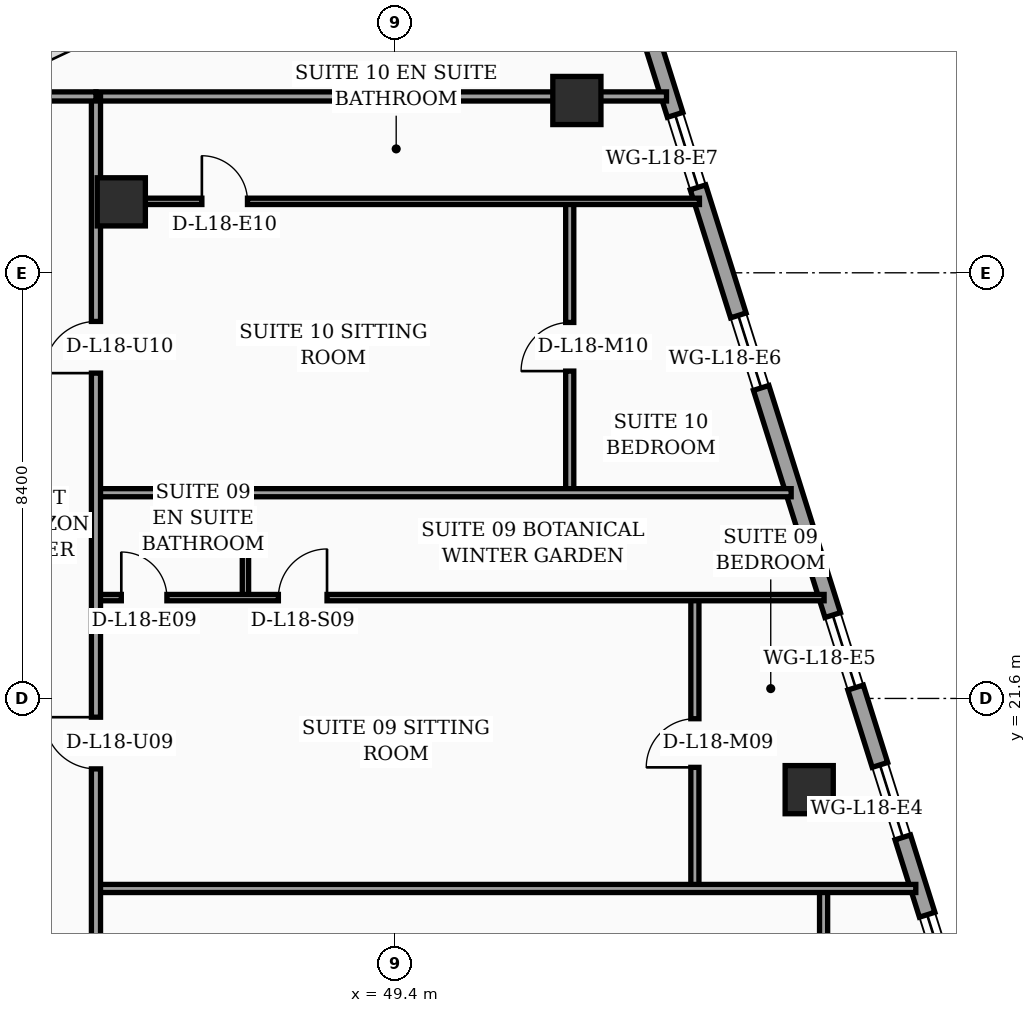
"""IFC4 building model, lengths in metres.
Left out: names, types, materials, properties, quantities, classifications, styles, units other than length and angle.
Written with IfcOpenShell. Run it as: python <this file> out.ifc"""

import sys

from ifc_helpers import new_model, si_unit, direction, frame, frame_2d, origin, origin_2d, place, context, subcontext, project, spatial, rectangle, hollow_rectangle, extrude, element, fill, save


model = new_model("IFC4")
c1 = context("Model", 3, precision=1e-05, world=origin(), true_north=direction((0.0, 1.0)))
c2 = subcontext(c1, "Body", "Model", "MODEL_VIEW")
j1 = project(units=[si_unit("LENGTHUNIT", "METRE"), si_unit("PLANEANGLEUNIT", "RADIAN")], contexts=[c1])
p1 = place(None, origin())
s1 = spatial("IfcSite", under=j1, at=p1, CompositionType="ELEMENT")
p2 = place(p1, origin())
s2 = spatial("IfcBuilding", under=s1, at=p2, CompositionType="ELEMENT")
p3 = place(p2, frame((0.0, 0.0, 77.4)))
s3 = spatial("IfcBuildingStorey", under=s2, at=p3, CompositionType="ELEMENT", Elevation=77.4)
for number, where, z_axis, x_axis in (
    (1, (44.0, 31.4, 0.0), (0.0, 0.0, 1.0), (1.0, 0.0, 0.0)),
    (2, (57.576, 19.8, 0.0), (0.0, 0.0, 1.0), (1.0, 0.0, 0.0)),
    (3, (52.991, 33.4, 0.0), (0.0, 0.0, 1.0), (1.0, 0.0, 0.0)),
):
    element("IfcColumn", number, at=place(p3, frame(where, z_axis=z_axis, x_axis=x_axis)), inside=s3, PredefinedType="COLUMN", context=c2, shape_type="SweptSolid", body=[
        extrude(hollow_rectangle(XDim=0.95, YDim=0.95, WallThickness=0.04, at=origin_2d()), origin(), (0.0, 0.0, 1.0), 3.56),
    ])
p4 = place(p3, frame((63.63, 5.505, 0.0), z_axis=(0.0, 0.0, 1.0), x_axis=(-0.300501856448, 0.953781229775, 0.0)))
e4 = element("IfcWall", 4, at=p4, inside=s3, PredefinedType="SOLIDWALL", context=c2, shape_type="SweptSolid", body=[
    extrude(rectangle(XDim=30.814, YDim=0.32, at=frame_2d((15.407, 0.0))), origin(), (0.0, 0.0, 1.0), 3.56),
])
p5 = place(p4, frame((4.747, 0.0, 0.0)))
e5 = element("IfcOpeningElement", 5, at=p5, cuts=e4, PredefinedType="OPENING", context=c2, shape_type="SweptSolid", body=[
    extrude(rectangle(XDim=1.4, YDim=2.25, at=frame_2d((0.7, 1.125))), frame((0.0, 0.17, 0.0), z_axis=(0.0, -1.0, 0.0), x_axis=(1.0, 0.0, 0.0)), (0.0, 0.0, 1.0), 0.34),
])
p6 = place(p4, frame((2.65, 0.0, 0.75)))
e6 = element("IfcOpeningElement", 6, at=p6, cuts=e4, PredefinedType="OPENING", context=c2, shape_type="SweptSolid", body=[
    extrude(rectangle(XDim=1.5, YDim=1.6, at=frame_2d((0.75, 0.8))), frame((0.0, 0.17, 0.0), z_axis=(0.0, -1.0, 0.0), x_axis=(1.0, 0.0, 0.0)), (0.0, 0.0, 1.0), 0.34),
])
p7 = place(p4, frame((7.8, 0.0, 0.75)))
e7 = element("IfcOpeningElement", 7, at=p7, cuts=e4, PredefinedType="OPENING", context=c2, shape_type="SweptSolid", body=[
    extrude(rectangle(XDim=1.5, YDim=1.6, at=frame_2d((0.75, 0.8))), frame((0.0, 0.17, 0.0), z_axis=(0.0, -1.0, 0.0), x_axis=(1.0, 0.0, 0.0)), (0.0, 0.0, 1.0), 0.34),
])
p8 = place(p4, frame((10.9, 0.0, 0.75)))
e8 = element("IfcOpeningElement", 8, at=p8, cuts=e4, PredefinedType="OPENING", context=c2, shape_type="SweptSolid", body=[
    extrude(rectangle(XDim=1.5, YDim=1.6, at=frame_2d((0.75, 0.8))), frame((0.0, 0.17, 0.0), z_axis=(0.0, -1.0, 0.0), x_axis=(1.0, 0.0, 0.0)), (0.0, 0.0, 1.0), 0.34),
])
p9 = place(p4, frame((14.0, 0.0, 0.75)))
e9 = element("IfcOpeningElement", 9, at=p9, cuts=e4, PredefinedType="OPENING", context=c2, shape_type="SweptSolid", body=[
    extrude(rectangle(XDim=1.5, YDim=1.6, at=frame_2d((0.75, 0.8))), frame((0.0, 0.17, 0.0), z_axis=(0.0, -1.0, 0.0), x_axis=(1.0, 0.0, 0.0)), (0.0, 0.0, 1.0), 0.34),
])
p10 = place(p4, frame((17.1, 0.0, 0.75)))
e10 = element("IfcOpeningElement", 10, at=p10, cuts=e4, PredefinedType="OPENING", context=c2, shape_type="SweptSolid", body=[
    extrude(rectangle(XDim=1.5, YDim=1.6, at=frame_2d((0.75, 0.8))), frame((0.0, 0.17, 0.0), z_axis=(0.0, -1.0, 0.0), x_axis=(1.0, 0.0, 0.0)), (0.0, 0.0, 1.0), 0.34),
])
p11 = place(p4, frame((23.3, 0.0, 0.75)))
e11 = element("IfcOpeningElement", 11, at=p11, cuts=e4, PredefinedType="OPENING", context=c2, shape_type="SweptSolid", body=[
    extrude(rectangle(XDim=1.5, YDim=1.6, at=frame_2d((0.75, 0.8))), frame((0.0, 0.17, 0.0), z_axis=(0.0, -1.0, 0.0), x_axis=(1.0, 0.0, 0.0)), (0.0, 0.0, 1.0), 0.34),
])
p12 = place(p4, frame((27.45, 0.0, 0.75)))
e12 = element("IfcOpeningElement", 12, at=p12, cuts=e4, PredefinedType="OPENING", context=c2, shape_type="SweptSolid", body=[
    extrude(rectangle(XDim=1.5, YDim=1.6, at=frame_2d((0.75, 0.8))), frame((0.0, 0.17, 0.0), z_axis=(0.0, -1.0, 0.0), x_axis=(1.0, 0.0, 0.0)), (0.0, 0.0, 1.0), 0.34),
])
p13 = place(p3, frame((57.86, 7.45, 0.0), z_axis=(0.0, 0.0, 1.0), x_axis=(0.0, 1.0, 0.0)))
e13 = element("IfcWall", 13, at=p13, inside=s3, PredefinedType="PARTITIONING", context=c2, shape_type="SweptSolid", body=[
    extrude(rectangle(XDim=10.4, YDim=0.16, at=frame_2d((5.2, 0.0))), origin(), (0.0, 0.0, 1.0), 3.04),
])
p14 = place(p13, frame((4.72, 0.0, 0.0)))
e14 = element("IfcOpeningElement", 14, at=p14, cuts=e13, PredefinedType="OPENING", context=c2, shape_type="SweptSolid", body=[
    extrude(rectangle(XDim=0.96, YDim=2.2, at=frame_2d((0.48, 1.1))), frame((0.0, 0.09, 0.0), z_axis=(0.0, -1.0, 0.0), x_axis=(1.0, 0.0, 0.0)), (0.0, 0.0, 1.0), 0.18),
])
p15 = place(p3, frame((46.45, 23.59, 0.0), z_axis=(0.0, 0.0, 1.0), x_axis=(0.0, 1.0, 0.0)))
e15 = element("IfcWall", 15, at=p15, inside=s3, PredefinedType="PARTITIONING", context=c2, shape_type="SweptSolid", body=[
    extrude(rectangle(XDim=2.07, YDim=0.125, at=frame_2d((1.035, 0.0))), origin(), (0.0, 0.0, 1.0), 3.19),
])
p16 = place(p3, frame((55.32, 17.85, 0.0), z_axis=(0.0, 0.0, 1.0), x_axis=(0.0, 1.0, 0.0)))
e16 = element("IfcWall", 16, at=p16, inside=s3, PredefinedType="PARTITIONING", context=c2, shape_type="SweptSolid", body=[
    extrude(rectangle(XDim=5.74, YDim=0.16, at=frame_2d((2.87, 0.0))), origin(), (0.0, 0.0, 1.0), 2.84),
])
p17 = place(p16, frame((2.39, 0.0, 0.0)))
e17 = element("IfcOpeningElement", 17, at=p17, cuts=e16, PredefinedType="OPENING", context=c2, shape_type="SweptSolid", body=[
    extrude(rectangle(XDim=0.96, YDim=2.2, at=frame_2d((0.48, 1.1))), frame((0.0, 0.09, 0.0), z_axis=(0.0, -1.0, 0.0), x_axis=(1.0, 0.0, 0.0)), (0.0, 0.0, 1.0), 0.18),
])
p18 = place(p3, frame((43.5, 23.59, 0.0), z_axis=(0.0, 0.0, 1.0), x_axis=(1.0, 0.0, 0.0)))
e18 = element("IfcWall", 18, at=p18, inside=s3, PredefinedType="PARTITIONING", context=c2, shape_type="SweptSolid", body=[
    extrude(rectangle(XDim=14.37, YDim=0.125, at=frame_2d((7.185, 0.0))), origin(), (0.0, 0.0, 1.0), 2.84),
])
p19 = place(p18, frame((0.5, 0.0, 0.0)))
e19 = element("IfcOpeningElement", 19, at=p19, cuts=e18, PredefinedType="OPENING", context=c2, shape_type="SweptSolid", body=[
    extrude(rectangle(XDim=0.9, YDim=2.15, at=frame_2d((0.45, 1.075))), frame((0.0, 0.073, 0.0), z_axis=(0.0, -1.0, 0.0), x_axis=(1.0, 0.0, 0.0)), (0.0, 0.0, 1.0), 0.145),
])
p20 = place(p18, frame((3.6, 0.0, 0.0)))
e20 = element("IfcOpeningElement", 20, at=p20, cuts=e18, PredefinedType="OPENING", context=c2, shape_type="SweptSolid", body=[
    extrude(rectangle(XDim=0.96, YDim=2.2, at=frame_2d((0.48, 1.1))), frame((0.0, 0.073, 0.0), z_axis=(0.0, -1.0, 0.0), x_axis=(1.0, 0.0, 0.0)), (0.0, 0.0, 1.0), 0.145),
])
p21 = place(p3, frame((52.85, 25.66, 0.0), z_axis=(0.0, 0.0, 1.0), x_axis=(0.0, 1.0, 0.0)))
e21 = element("IfcWall", 21, at=p21, inside=s3, PredefinedType="PARTITIONING", context=c2, shape_type="SweptSolid", body=[
    extrude(rectangle(XDim=5.75, YDim=0.16, at=frame_2d((2.875, 0.0))), origin(), (0.0, 0.0, 1.0), 3.56),
])
p22 = place(p21, frame((2.4, 0.0, 0.0)))
e22 = element("IfcOpeningElement", 22, at=p22, cuts=e21, PredefinedType="OPENING", context=c2, shape_type="SweptSolid", body=[
    extrude(rectangle(XDim=0.96, YDim=2.2, at=frame_2d((0.48, 1.1))), frame((0.0, 0.09, 0.0), z_axis=(0.0, -1.0, 0.0), x_axis=(1.0, 0.0, 0.0)), (0.0, 0.0, 1.0), 0.18),
])
p23 = place(p3, frame((43.5, 31.41, 0.0), z_axis=(0.0, 0.0, 1.0), x_axis=(1.0, 0.0, 0.0)))
e23 = element("IfcWall", 23, at=p23, inside=s3, PredefinedType="PARTITIONING", context=c2, shape_type="SweptSolid", body=[
    extrude(rectangle(XDim=11.91, YDim=0.125, at=frame_2d((5.955, 0.0))), origin(), (0.0, 0.0, 1.0), 2.84),
])
p24 = place(p23, frame((2.09, 0.0, 0.0)))
e24 = element("IfcOpeningElement", 24, at=p24, cuts=e23, PredefinedType="OPENING", context=c2, shape_type="SweptSolid", body=[
    extrude(rectangle(XDim=0.9, YDim=2.15, at=frame_2d((0.45, 1.075))), frame((0.0, 0.073, 0.0), z_axis=(0.0, -1.0, 0.0), x_axis=(1.0, 0.0, 0.0)), (0.0, 0.0, 1.0), 0.145),
])
p25 = place(p3, frame((43.5, 25.66, 0.0), z_axis=(0.0, 0.0, 1.0), x_axis=(1.0, 0.0, 0.0)))
e25 = element("IfcWall", 25, at=p25, inside=s3, PredefinedType="PARTITIONING", context=c2, shape_type="SweptSolid", body=[
    extrude(rectangle(XDim=13.72, YDim=0.16, at=frame_2d((6.86, 0.0))), origin(), (0.0, 0.0, 1.0), 2.84),
])
p26 = place(p3, frame((43.5, 17.85, 0.0), z_axis=(0.0, 0.0, 1.0), x_axis=(1.0, 0.0, 0.0)))
e26 = element("IfcWall", 26, at=p26, inside=s3, PredefinedType="PARTITIONING", context=c2, shape_type="SweptSolid", body=[
    extrude(rectangle(XDim=16.18, YDim=0.16, at=frame_2d((8.09, 0.0))), origin(), (0.0, 0.0, 1.0), 2.84),
])
p27 = place(p3, frame((43.5, 33.48, 0.0), z_axis=(0.0, 0.0, 1.0), x_axis=(1.0, 0.0, 0.0)))
e27 = element("IfcWall", 27, at=p27, inside=s3, PredefinedType="PARTITIONING", context=c2, shape_type="SweptSolid", body=[
    extrude(rectangle(XDim=11.26, YDim=0.18, at=frame_2d((5.63, 0.0))), origin(), (0.0, 0.0, 1.0), 2.84),
])
p28 = place(p3, frame((43.5, 2.44, 0.0), z_axis=(0.0, 0.0, 1.0), x_axis=(0.0, 1.0, 0.0)))
e28 = element("IfcWall", 28, at=p28, inside=s3, PredefinedType="PARTITIONING", context=c2, shape_type="SweptSolid", body=[
    extrude(rectangle(XDim=31.04, YDim=0.18, at=frame_2d((15.52, 0.0))), origin(), (0.0, 0.0, 1.0), 2.84),
])
p29 = place(p28, frame((13.26, 0.0, 0.0)))
e29 = element("IfcOpeningElement", 29, at=p29, cuts=e28, PredefinedType="OPENING", context=c2, shape_type="SweptSolid", body=[
    extrude(rectangle(XDim=1.02, YDim=2.2, at=frame_2d((0.51, 1.1))), frame((0.0, 0.1, 0.0), z_axis=(0.0, -1.0, 0.0), x_axis=(1.0, 0.0, 0.0)), (0.0, 0.0, 1.0), 0.2),
])
p30 = place(p28, frame((17.77, 0.0, 0.0)))
e30 = element("IfcOpeningElement", 30, at=p30, cuts=e28, PredefinedType="OPENING", context=c2, shape_type="SweptSolid", body=[
    extrude(rectangle(XDim=1.02, YDim=2.2, at=frame_2d((0.51, 1.1))), frame((0.0, 0.1, 0.0), z_axis=(0.0, -1.0, 0.0), x_axis=(1.0, 0.0, 0.0)), (0.0, 0.0, 1.0), 0.2),
])
p31 = place(p28, frame((25.58, 0.0, 0.0)))
e31 = element("IfcOpeningElement", 31, at=p31, cuts=e28, PredefinedType="OPENING", context=c2, shape_type="SweptSolid", body=[
    extrude(rectangle(XDim=1.02, YDim=2.2, at=frame_2d((0.51, 1.1))), frame((0.0, 0.1, 0.0), z_axis=(0.0, -1.0, 0.0), x_axis=(1.0, 0.0, 0.0)), (0.0, 0.0, 1.0), 0.2),
])
p32 = place(p3, frame((41.15, 33.48, 0.0), z_axis=(0.0, 0.0, 1.0), x_axis=(1.0, 0.0, 0.0)))
e32 = element("IfcWall", 32, at=p32, inside=s3, PredefinedType="PARTITIONING", context=c2, shape_type="SweptSolid", body=[
    extrude(rectangle(XDim=2.35, YDim=0.18, at=frame_2d((1.175, 0.0))), origin(), (0.0, 0.0, 1.0), 3.56),
])
p33 = place(p8, origin())
e33 = element("IfcWindow", 33, at=p33, inside=s3, PartitioningType="SINGLE_PANEL", PredefinedType="WINDOW", context=c2, shape_type="SweptSolid", body=[
    extrude(rectangle(XDim=1.5, YDim=1.6, at=frame_2d((0.75, 0.8))), frame((0.0, 0.03, 0.0), z_axis=(0.0, -1.0, 0.0), x_axis=(1.0, 0.0, 0.0)), (0.0, 0.0, 1.0), 0.06),
])
fill(e8, e33)
p34 = place(p9, origin())
e34 = element("IfcWindow", 34, at=p34, inside=s3, PartitioningType="SINGLE_PANEL", PredefinedType="WINDOW", context=c2, shape_type="SweptSolid", body=[
    extrude(rectangle(XDim=1.5, YDim=1.6, at=frame_2d((0.75, 0.8))), frame((0.0, 0.03, 0.0), z_axis=(0.0, -1.0, 0.0), x_axis=(1.0, 0.0, 0.0)), (0.0, 0.0, 1.0), 0.06),
])
fill(e9, e34)
p35 = place(p10, origin())
e35 = element("IfcWindow", 35, at=p35, inside=s3, PartitioningType="SINGLE_PANEL", PredefinedType="WINDOW", context=c2, shape_type="SweptSolid", body=[
    extrude(rectangle(XDim=1.5, YDim=1.6, at=frame_2d((0.75, 0.8))), frame((0.0, 0.03, 0.0), z_axis=(0.0, -1.0, 0.0), x_axis=(1.0, 0.0, 0.0)), (0.0, 0.0, 1.0), 0.06),
])
fill(e10, e35)
p36 = place(p11, origin())
e36 = element("IfcWindow", 36, at=p36, inside=s3, PartitioningType="SINGLE_PANEL", PredefinedType="WINDOW", context=c2, shape_type="SweptSolid", body=[
    extrude(rectangle(XDim=1.5, YDim=1.6, at=frame_2d((0.75, 0.8))), frame((0.0, 0.03, 0.0), z_axis=(0.0, -1.0, 0.0), x_axis=(1.0, 0.0, 0.0)), (0.0, 0.0, 1.0), 0.06),
])
fill(e11, e36)
p37 = place(p12, origin())
e37 = element("IfcWindow", 37, at=p37, inside=s3, PartitioningType="SINGLE_PANEL", PredefinedType="WINDOW", context=c2, shape_type="SweptSolid", body=[
    extrude(rectangle(XDim=1.5, YDim=1.6, at=frame_2d((0.75, 0.8))), frame((0.0, 0.03, 0.0), z_axis=(0.0, -1.0, 0.0), x_axis=(1.0, 0.0, 0.0)), (0.0, 0.0, 1.0), 0.06),
])
fill(e12, e37)
p38 = place(p17, origin())
e38 = element("IfcDoor", 38, at=p38, inside=s3, OperationType="SINGLE_SWING_LEFT", PredefinedType="DOOR", context=c2, shape_type="SweptSolid", body=[
    extrude(rectangle(XDim=0.96, YDim=2.2, at=frame_2d((0.48, 1.1))), frame((0.0, 0.025, 0.0), z_axis=(0.0, -1.0, 0.0), x_axis=(1.0, 0.0, 0.0)), (0.0, 0.0, 1.0), 0.05),
])
fill(e17, e38)
p39 = place(p19, origin())
e39 = element("IfcDoor", 39, at=p39, inside=s3, OperationType="SINGLE_SWING_LEFT", PredefinedType="DOOR", context=c2, shape_type="SweptSolid", body=[
    extrude(rectangle(XDim=0.9, YDim=2.15, at=frame_2d((0.45, 1.075))), frame((0.0, 0.025, 0.0), z_axis=(0.0, -1.0, 0.0), x_axis=(1.0, 0.0, 0.0)), (0.0, 0.0, 1.0), 0.05),
])
fill(e19, e39)
p40 = place(p20, origin())
e40 = element("IfcDoor", 40, at=p40, inside=s3, OperationType="SINGLE_SWING_RIGHT", PredefinedType="DOOR", context=c2, shape_type="SweptSolid", body=[
    extrude(rectangle(XDim=0.96, YDim=2.2, at=frame_2d((0.48, 1.1))), frame((0.0, 0.025, 0.0), z_axis=(0.0, -1.0, 0.0), x_axis=(1.0, 0.0, 0.0)), (0.0, 0.0, 1.0), 0.05),
])
fill(e20, e40)
p41 = place(p22, origin())
e41 = element("IfcDoor", 41, at=p41, inside=s3, OperationType="SINGLE_SWING_LEFT", PredefinedType="DOOR", context=c2, shape_type="SweptSolid", body=[
    extrude(rectangle(XDim=0.96, YDim=2.2, at=frame_2d((0.48, 1.1))), frame((0.0, 0.025, 0.0), z_axis=(0.0, -1.0, 0.0), x_axis=(1.0, 0.0, 0.0)), (0.0, 0.0, 1.0), 0.05),
])
fill(e22, e41)
p42 = place(p24, origin())
e42 = element("IfcDoor", 42, at=p42, inside=s3, OperationType="SINGLE_SWING_LEFT", PredefinedType="DOOR", context=c2, shape_type="SweptSolid", body=[
    extrude(rectangle(XDim=0.9, YDim=2.15, at=frame_2d((0.45, 1.075))), frame((0.0, 0.025, 0.0), z_axis=(0.0, -1.0, 0.0), x_axis=(1.0, 0.0, 0.0)), (0.0, 0.0, 1.0), 0.05),
])
fill(e24, e42)
p43 = place(p30, origin())
e43 = element("IfcDoor", 43, at=p43, inside=s3, OperationType="SINGLE_SWING_RIGHT", PredefinedType="DOOR", context=c2, shape_type="SweptSolid", body=[
    extrude(rectangle(XDim=1.02, YDim=2.2, at=frame_2d((0.51, 1.1))), frame((0.0, 0.025, 0.0), z_axis=(0.0, -1.0, 0.0), x_axis=(1.0, 0.0, 0.0)), (0.0, 0.0, 1.0), 0.05),
])
fill(e30, e43)
p44 = place(p31, origin())
e44 = element("IfcDoor", 44, at=p44, inside=s3, OperationType="SINGLE_SWING_LEFT", PredefinedType="DOOR", context=c2, shape_type="SweptSolid", body=[
    extrude(rectangle(XDim=1.02, YDim=2.2, at=frame_2d((0.51, 1.1))), frame((0.0, 0.025, 0.0), z_axis=(0.0, -1.0, 0.0), x_axis=(1.0, 0.0, 0.0)), (0.0, 0.0, 1.0), 0.05),
])
fill(e31, e44)
save(model, sys.argv[1])
